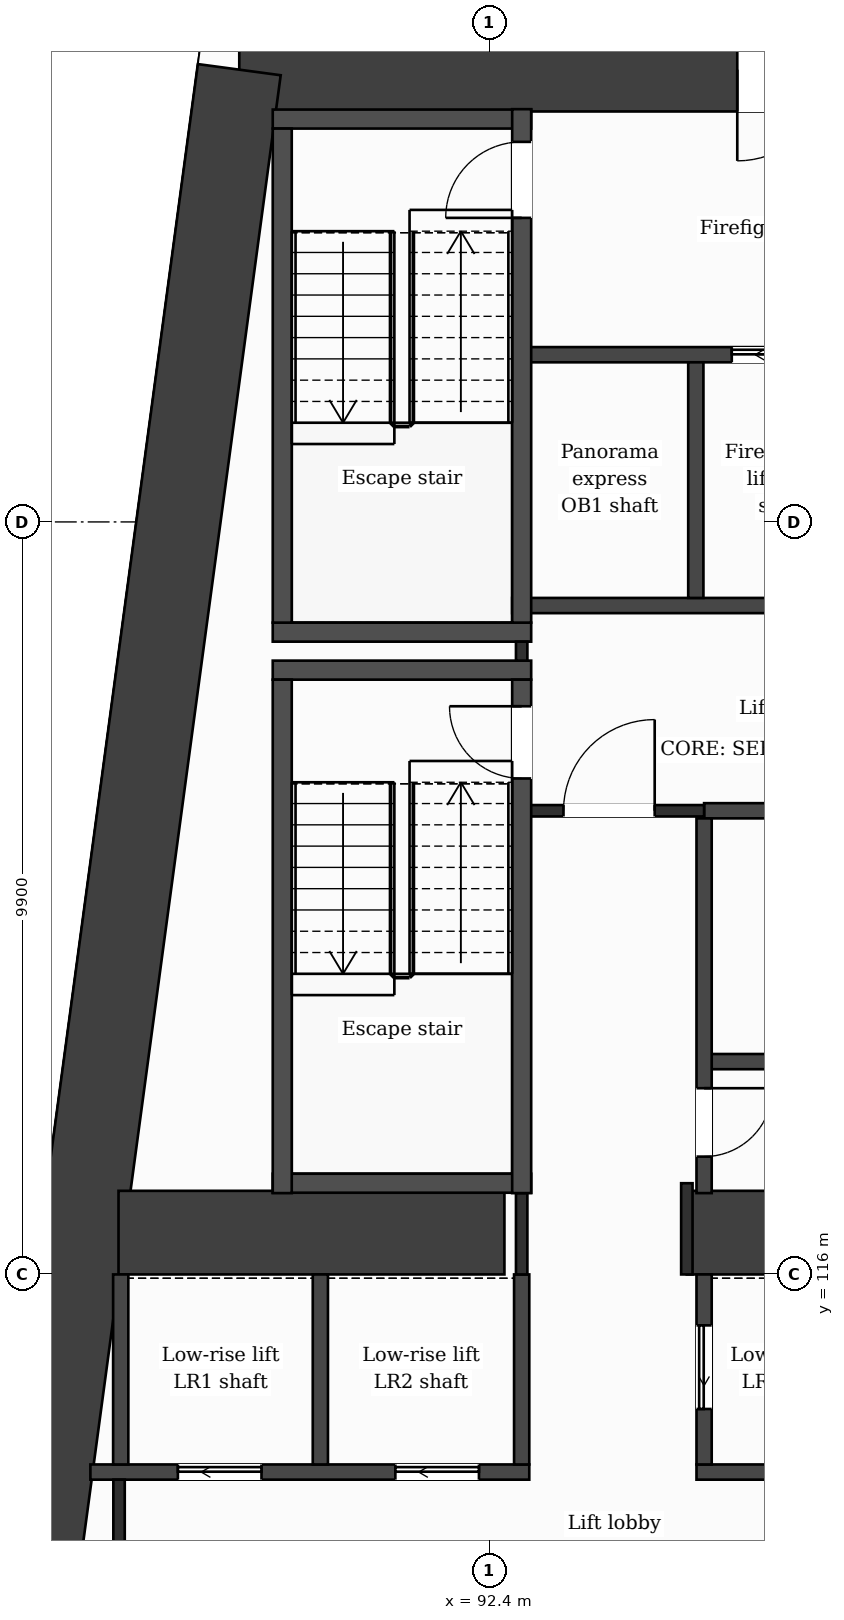
"""IFC4 building model, lengths in metres.
Left out: names, types, materials, properties, quantities, classifications, styles, units other than length and angle.
Written with IfcOpenShell. Run it as: python <this file> out.ifc"""

import sys

from ifc_helpers import new_model, si_unit, direction, frame, frame_2d, origin, place, context, subcontext, project, spatial, rectangle, extrude, element, fill, save


model = new_model("IFC4")
c1 = context("Model", 3, precision=1e-05, world=origin(), true_north=direction((0.0, 1.0)))
c2 = subcontext(c1, "Body", "Model", "MODEL_VIEW")
j1 = project(units=[si_unit("LENGTHUNIT", "METRE"), si_unit("PLANEANGLEUNIT", "RADIAN")], contexts=[c1])
p1 = place(None, origin())
s1 = spatial("IfcSite", under=j1, at=p1, CompositionType="ELEMENT")
p2 = place(p1, origin())
s2 = spatial("IfcBuilding", under=s1, at=p2, CompositionType="ELEMENT")
p3 = place(p2, frame((0.0, 0.0, 42.5)))
s3 = spatial("IfcBuildingStorey", under=s2, at=p3, CompositionType="ELEMENT", Elevation=42.5)
p4 = place(p3, frame((89.112, 131.85, 0.0), z_axis=(0.0, 0.0, 1.0), x_axis=(1.0, 0.0, 0.0)))
e1 = element("IfcWall", 1, at=p4, inside=s3, PredefinedType="SHEAR", context=c2, shape_type="SweptSolid", body=[
    extrude(rectangle(XDim=11.138, YDim=1.1, at=frame_2d((5.569, 0.0))), origin(), (0.0, 0.0, 1.0), 3.5),
])
p5 = place(p4, frame((6.552, 0.0, 0.0)))
e2 = element("IfcOpeningElement", 2, at=p5, cuts=e1, PredefinedType="OPENING", context=c2, shape_type="SweptSolid", body=[
    extrude(rectangle(XDim=1.2, YDim=2.1, at=frame_2d((0.6, 1.05))), frame((0.0, 0.56, 0.0), z_axis=(0.0, -1.0, 0.0), x_axis=(1.0, 0.0, 0.0)), (0.0, 0.0, 1.0), 1.12),
])
p6 = place(p3, frame((86.298, 110.95, 0.0), z_axis=(0.0, 0.0, 1.0), x_axis=(0.133400422634, 0.99106222168, 0.0)))
e3 = element("IfcWall", 3, at=p6, inside=s3, PredefinedType="SHEAR", context=c2, shape_type="SweptSolid", body=[
    extrude(rectangle(XDim=21.089, YDim=1.1, at=frame_2d((10.544, 0.0))), origin(), (0.0, 0.0, 1.0), 3.5),
])
p7 = place(p3, frame((87.523, 116.55, 0.0), z_axis=(0.0, 0.0, 1.0), x_axis=(1.0, 0.0, 0.0)))
e4 = element("IfcWall", 4, at=p7, inside=s3, PredefinedType="SHEAR", context=c2, shape_type="SweptSolid", body=[
    extrude(rectangle(XDim=5.077, YDim=1.1, at=frame_2d((2.539, 0.0))), origin(), (0.0, 0.0, 1.0), 3.5),
])
p8 = place(p3, frame((95.0, 116.55, 0.0), z_axis=(0.0, 0.0, 1.0), x_axis=(1.0, 0.0, 0.0)))
e5 = element("IfcWall", 5, at=p8, inside=s3, PredefinedType="SHEAR", context=c2, shape_type="SweptSolid", body=[
    extrude(rectangle(XDim=4.7, YDim=1.1, at=frame_2d((2.35, 0.0))), origin(), (0.0, 0.0, 1.0), 3.5),
])
p9 = place(p3, frame((87.153, 113.4, 0.0), z_axis=(0.0, 0.0, 1.0), x_axis=(1.0, 0.0, 0.0)))
e6 = element("IfcWall", 6, at=p9, inside=s3, PredefinedType="PARTITIONING", context=c2, shape_type="SweptSolid", body=[
    extrude(rectangle(XDim=5.774, YDim=0.2, at=frame_2d((2.887, 0.0))), origin(), (0.0, 0.0, 1.0), 3.18),
])
p10 = place(p9, frame((1.151, 0.0, 0.0)))
e7 = element("IfcOpeningElement", 7, at=p10, cuts=e6, PredefinedType="OPENING", context=c2, shape_type="SweptSolid", body=[
    extrude(rectangle(XDim=1.1, YDim=2.1, at=frame_2d((0.55, 1.05))), frame((0.0, 0.11, 0.0), z_axis=(0.0, -1.0, 0.0), x_axis=(1.0, 0.0, 0.0)), (0.0, 0.0, 1.0), 0.22),
])
p11 = place(p9, frame((4.012, 0.0, 0.0)))
e8 = element("IfcOpeningElement", 8, at=p11, cuts=e6, PredefinedType="OPENING", context=c2, shape_type="SweptSolid", body=[
    extrude(rectangle(XDim=1.1, YDim=2.1, at=frame_2d((0.55, 1.05))), frame((0.0, 0.11, 0.0), z_axis=(0.0, -1.0, 0.0), x_axis=(1.0, 0.0, 0.0)), (0.0, 0.0, 1.0), 0.22),
])
p12 = place(p3, frame((95.127, 113.4, 0.0), z_axis=(0.0, 0.0, 1.0), x_axis=(1.0, 0.0, 0.0)))
e9 = element("IfcWall", 9, at=p12, inside=s3, PredefinedType="PARTITIONING", context=c2, shape_type="SweptSolid", body=[
    extrude(rectangle(XDim=4.573, YDim=0.2, at=frame_2d((2.287, 0.0))), origin(), (0.0, 0.0, 1.0), 3.18),
])
p13 = place(p12, frame((3.068, 0.0, 0.0)))
e10 = element("IfcOpeningElement", 10, at=p13, cuts=e9, PredefinedType="OPENING", context=c2, shape_type="SweptSolid", body=[
    extrude(rectangle(XDim=0.9, YDim=2.1, at=frame_2d((0.45, 1.05))), frame((0.0, 0.11, 0.0), z_axis=(0.0, -1.0, 0.0), x_axis=(1.0, 0.0, 0.0)), (0.0, 0.0, 1.0), 0.22),
])
p14 = place(p3, frame((89.552, 117.2, 0.0), z_axis=(0.0, 0.0, 1.0), x_axis=(1.0, 0.0, 0.0)))
e11 = element("IfcWall", 11, at=p14, inside=s3, PredefinedType="PARTITIONING", context=c2, shape_type="SweptSolid", body=[
    extrude(rectangle(XDim=3.4, YDim=0.25, at=frame_2d((1.7, 0.0))), origin(), (0.0, 0.0, 1.0), 3.18),
])
p15 = place(p3, frame((95.227, 118.8, 0.0), z_axis=(0.0, 0.0, 1.0), x_axis=(1.0, 0.0, 0.0)))
e12 = element("IfcWall", 12, at=p15, inside=s3, PredefinedType="PARTITIONING", context=c2, shape_type="SweptSolid", body=[
    extrude(rectangle(XDim=4.473, YDim=0.2, at=frame_2d((2.236, 0.0))), origin(), (0.0, 0.0, 1.0), 3.18),
])
p16 = place(p3, frame((95.227, 122.1, 0.0), z_axis=(0.0, 0.0, 1.0), x_axis=(1.0, 0.0, 0.0)))
e13 = element("IfcWall", 13, at=p16, inside=s3, PredefinedType="PARTITIONING", context=c2, shape_type="SweptSolid", body=[
    extrude(rectangle(XDim=4.473, YDim=0.2, at=frame_2d((2.236, 0.0))), origin(), (0.0, 0.0, 1.0), 3.18),
])
p17 = place(p16, frame((1.786, 0.0, 0.0)))
e14 = element("IfcOpeningElement", 14, at=p17, cuts=e13, PredefinedType="OPENING", context=c2, shape_type="SweptSolid", body=[
    extrude(rectangle(XDim=0.9, YDim=2.1, at=frame_2d((0.45, 1.05))), frame((0.0, 0.11, 0.0), z_axis=(0.0, -1.0, 0.0), x_axis=(1.0, 0.0, 0.0)), (0.0, 0.0, 1.0), 0.22),
])
p18 = place(p3, frame((92.827, 122.1, 0.0), z_axis=(0.0, 0.0, 1.0), x_axis=(1.0, 0.0, 0.0)))
e15 = element("IfcWall", 15, at=p18, inside=s3, PredefinedType="PARTITIONING", context=c2, shape_type="SweptSolid", body=[
    extrude(rectangle(XDim=2.4, YDim=0.15, at=frame_2d((1.2, 0.0))), origin(), (0.0, 0.0, 1.0), 3.18),
])
p19 = place(p18, frame((0.55, 0.0, 0.0)))
e16 = element("IfcOpeningElement", 16, at=p19, cuts=e15, PredefinedType="OPENING", context=c2, shape_type="SweptSolid", body=[
    extrude(rectangle(XDim=1.2, YDim=2.1, at=frame_2d((0.6, 1.05))), frame((0.0, 0.085, 0.0), z_axis=(0.0, -1.0, 0.0), x_axis=(1.0, 0.0, 0.0)), (0.0, 0.0, 1.0), 0.17),
])
for number, where, z_axis, x_axis in (
    (17, (89.552, 123.95, 0.0), (0.0, 0.0, 1.0), (1.0, 0.0, 0.0)),
    (18, (89.552, 124.45, 0.0), (0.0, 0.0, 1.0), (1.0, 0.0, 0.0)),
):
    element("IfcWall", number, at=place(p3, frame(where, z_axis=z_axis, x_axis=x_axis)), inside=s3, PredefinedType="PARTITIONING", context=c2, shape_type="SweptSolid", body=[
        extrude(rectangle(XDim=3.4, YDim=0.25, at=frame_2d((1.7, 0.0))), origin(), (0.0, 0.0, 1.0), 3.18),
    ])
p20 = place(p3, frame((92.702, 124.8, 0.0), z_axis=(0.0, 0.0, 1.0), x_axis=(1.0, 0.0, 0.0)))
e19 = element("IfcWall", 19, at=p20, inside=s3, PredefinedType="PARTITIONING", context=c2, shape_type="SweptSolid", body=[
    extrude(rectangle(XDim=6.998, YDim=0.2, at=frame_2d((3.499, 0.0))), origin(), (0.0, 0.0, 1.0), 3.18),
])
p21 = place(p20, frame((5.253, 0.0, 0.0)))
e20 = element("IfcOpeningElement", 20, at=p21, cuts=e19, PredefinedType="OPENING", context=c2, shape_type="SweptSolid", body=[
    extrude(rectangle(XDim=1.1, YDim=2.1, at=frame_2d((0.55, 1.05))), frame((0.0, 0.11, 0.0), z_axis=(0.0, -1.0, 0.0), x_axis=(1.0, 0.0, 0.0)), (0.0, 0.0, 1.0), 0.22),
])
p22 = place(p3, frame((92.827, 128.1, 0.0), z_axis=(0.0, 0.0, 1.0), x_axis=(1.0, 0.0, 0.0)))
e21 = element("IfcWall", 21, at=p22, inside=s3, PredefinedType="PARTITIONING", context=c2, shape_type="SweptSolid", body=[
    extrude(rectangle(XDim=6.873, YDim=0.2, at=frame_2d((3.437, 0.0))), origin(), (0.0, 0.0, 1.0), 3.18),
])
p23 = place(p22, frame((2.764, 0.0, 0.0)))
e22 = element("IfcOpeningElement", 22, at=p23, cuts=e21, PredefinedType="OPENING", context=c2, shape_type="SweptSolid", body=[
    extrude(rectangle(XDim=1.1, YDim=2.1, at=frame_2d((0.55, 1.05))), frame((0.0, 0.11, 0.0), z_axis=(0.0, -1.0, 0.0), x_axis=(1.0, 0.0, 0.0)), (0.0, 0.0, 1.0), 0.22),
])
p24 = place(p3, frame((89.552, 131.2, 0.0), z_axis=(0.0, 0.0, 1.0), x_axis=(1.0, 0.0, 0.0)))
e23 = element("IfcWall", 23, at=p24, inside=s3, PredefinedType="PARTITIONING", context=c2, shape_type="SweptSolid", body=[
    extrude(rectangle(XDim=3.4, YDim=0.25, at=frame_2d((1.7, 0.0))), origin(), (0.0, 0.0, 1.0), 3.18),
])
p25 = place(p3, frame((87.552, 113.5, 0.0), z_axis=(0.0, 0.0, 1.0), x_axis=(0.0, 1.0, 0.0)))
e24 = element("IfcWall", 24, at=p25, inside=s3, PredefinedType="PARTITIONING", context=c2, shape_type="SweptSolid", body=[
    extrude(rectangle(XDim=2.5, YDim=0.2, at=frame_2d((1.25, 0.0))), origin(), (0.0, 0.0, 1.0), 3.18),
])
p26 = place(p3, frame((87.53, 111.5, 0.0), z_axis=(0.0, 0.0, 1.0), x_axis=(0.0, 1.0, 0.0)))
e25 = element("IfcWall", 25, at=p26, inside=s3, PredefinedType="PARTITIONING", context=c2, shape_type="SweptSolid", body=[
    extrude(rectangle(XDim=1.8, YDim=0.15, at=frame_2d((0.9, 0.0))), origin(), (0.0, 0.0, 1.0), 3.18),
])
p27 = place(p3, frame((89.677, 117.07, 0.0), z_axis=(0.0, 0.0, 1.0), x_axis=(0.0, 1.0, 0.0)))
e26 = element("IfcWall", 26, at=p27, inside=s3, PredefinedType="PARTITIONING", context=c2, shape_type="SweptSolid", body=[
    extrude(rectangle(XDim=6.755, YDim=0.25, at=frame_2d((3.377, 0.0))), origin(), (0.0, 0.0, 1.0), 3.18),
])
p28 = place(p3, frame((89.677, 124.575, 0.0), z_axis=(0.0, 0.0, 1.0), x_axis=(0.0, 1.0, 0.0)))
e27 = element("IfcWall", 27, at=p28, inside=s3, PredefinedType="PARTITIONING", context=c2, shape_type="SweptSolid", body=[
    extrude(rectangle(XDim=6.5, YDim=0.25, at=frame_2d((3.25, 0.0))), origin(), (0.0, 0.0, 1.0), 3.18),
])
for number, where, z_axis, x_axis in (
    (28, (90.178, 113.5, 0.0), (0.0, 0.0, 1.0), (0.0, 1.0, 0.0)),
    (29, (92.827, 113.5, 0.0), (0.0, 0.0, 1.0), (0.0, 1.0, 0.0)),
):
    element("IfcWall", number, at=place(p3, frame(where, z_axis=z_axis, x_axis=x_axis)), inside=s3, PredefinedType="PARTITIONING", context=c2, shape_type="SweptSolid", body=[
        extrude(rectangle(XDim=2.5, YDim=0.2, at=frame_2d((1.25, 0.0))), origin(), (0.0, 0.0, 1.0), 3.18),
    ])
p29 = place(p3, frame((92.827, 116.0, 0.0), z_axis=(0.0, 0.0, 1.0), x_axis=(0.0, 1.0, 0.0)))
e30 = element("IfcWall", 30, at=p29, inside=s3, PredefinedType="PARTITIONING", context=c2, shape_type="SweptSolid", body=[
    extrude(rectangle(XDim=1.07, YDim=0.15, at=frame_2d((0.535, 0.0))), origin(), (0.0, 0.0, 1.0), 3.18),
])
p30 = place(p3, frame((92.827, 124.075, 0.0), z_axis=(0.0, 0.0, 1.0), x_axis=(0.0, 1.0, 0.0)))
e31 = element("IfcWall", 31, at=p30, inside=s3, PredefinedType="PARTITIONING", context=c2, shape_type="SweptSolid", body=[
    extrude(rectangle(XDim=0.25, YDim=0.15, at=frame_2d((0.125, 0.0))), origin(), (0.0, 0.0, 1.0), 3.18),
])
p31 = place(p3, frame((92.827, 117.07, 0.0), z_axis=(0.0, 0.0, 1.0), x_axis=(0.0, 1.0, 0.0)))
e32 = element("IfcWall", 32, at=p31, inside=s3, PredefinedType="PARTITIONING", context=c2, shape_type="SweptSolid", body=[
    extrude(rectangle(XDim=6.755, YDim=0.25, at=frame_2d((3.377, 0.0))), origin(), (0.0, 0.0, 1.0), 3.18),
])
p32 = place(p31, frame((5.455, 0.0, 0.0)))
e33 = element("IfcOpeningElement", 33, at=p32, cuts=e32, PredefinedType="OPENING", context=c2, shape_type="SweptSolid", body=[
    extrude(rectangle(XDim=0.95, YDim=2.1, at=frame_2d((0.475, 1.05))), frame((0.0, 0.135, 0.0), z_axis=(0.0, -1.0, 0.0), x_axis=(1.0, 0.0, 0.0)), (0.0, 0.0, 1.0), 0.27),
])
p33 = place(p3, frame((92.827, 124.575, 0.0), z_axis=(0.0, 0.0, 1.0), x_axis=(0.0, 1.0, 0.0)))
e34 = element("IfcWall", 34, at=p33, inside=s3, PredefinedType="PARTITIONING", context=c2, shape_type="SweptSolid", body=[
    extrude(rectangle(XDim=6.755, YDim=0.25, at=frame_2d((3.377, 0.0))), origin(), (0.0, 0.0, 1.0), 3.18),
])
p34 = place(p33, frame((5.325, 0.0, 0.0)))
e35 = element("IfcOpeningElement", 35, at=p34, cuts=e34, PredefinedType="OPENING", context=c2, shape_type="SweptSolid", body=[
    extrude(rectangle(XDim=1.0, YDim=2.1, at=frame_2d((0.5, 1.05))), frame((0.0, 0.135, 0.0), z_axis=(0.0, -1.0, 0.0), x_axis=(1.0, 0.0, 0.0)), (0.0, 0.0, 1.0), 0.27),
])
p35 = place(p3, frame((95.0, 116.0, 0.0), z_axis=(0.0, 0.0, 1.0), x_axis=(0.0, 1.0, 0.0)))
e36 = element("IfcWall", 36, at=p35, inside=s3, PredefinedType="PARTITIONING", context=c2, shape_type="SweptSolid", body=[
    extrude(rectangle(XDim=1.2, YDim=0.15, at=frame_2d((0.6, 0.0))), origin(), (0.0, 0.0, 1.0), 3.18),
])
p36 = place(p3, frame((95.118, 124.9, 0.0), z_axis=(0.0, 0.0, 1.0), x_axis=(0.0, 1.0, 0.0)))
e37 = element("IfcWall", 37, at=p36, inside=s3, PredefinedType="PARTITIONING", context=c2, shape_type="SweptSolid", body=[
    extrude(rectangle(XDim=3.1, YDim=0.2, at=frame_2d((1.55, 0.0))), origin(), (0.0, 0.0, 1.0), 3.18),
])
p37 = place(p3, frame((95.227, 113.5, 0.0), z_axis=(0.0, 0.0, 1.0), x_axis=(0.0, 1.0, 0.0)))
e38 = element("IfcWall", 38, at=p37, inside=s3, PredefinedType="PARTITIONING", context=c2, shape_type="SweptSolid", body=[
    extrude(rectangle(XDim=2.5, YDim=0.2, at=frame_2d((1.25, 0.0))), origin(), (0.0, 0.0, 1.0), 3.18),
])
p38 = place(p37, frame((0.73, 0.0, 0.0)))
e39 = element("IfcOpeningElement", 39, at=p38, cuts=e38, PredefinedType="OPENING", context=c2, shape_type="SweptSolid", body=[
    extrude(rectangle(XDim=1.1, YDim=2.1, at=frame_2d((0.55, 1.05))), frame((0.0, 0.11, 0.0), z_axis=(0.0, -1.0, 0.0), x_axis=(1.0, 0.0, 0.0)), (0.0, 0.0, 1.0), 0.22),
])
p39 = place(p3, frame((95.227, 117.07, 0.0), z_axis=(0.0, 0.0, 1.0), x_axis=(0.0, 1.0, 0.0)))
e40 = element("IfcWall", 40, at=p39, inside=s3, PredefinedType="PARTITIONING", context=c2, shape_type="SweptSolid", body=[
    extrude(rectangle(XDim=4.93, YDim=0.2, at=frame_2d((2.465, 0.0))), origin(), (0.0, 0.0, 1.0), 3.18),
])
p40 = place(p39, frame((0.48, 0.0, 0.0)))
e41 = element("IfcOpeningElement", 41, at=p40, cuts=e40, PredefinedType="OPENING", context=c2, shape_type="SweptSolid", body=[
    extrude(rectangle(XDim=0.9, YDim=2.1, at=frame_2d((0.45, 1.05))), frame((0.0, 0.11, 0.0), z_axis=(0.0, -1.0, 0.0), x_axis=(1.0, 0.0, 0.0)), (0.0, 0.0, 1.0), 0.22),
])
p41 = place(p19, origin())
e42 = element("IfcDoor", 42, at=p41, inside=s3, OperationType="SINGLE_SWING_RIGHT", PredefinedType="DOOR", context=c2, shape_type="SweptSolid", body=[
    extrude(rectangle(XDim=1.2, YDim=2.1, at=frame_2d((0.6, 1.05))), frame((0.0, 0.025, 0.0), z_axis=(0.0, -1.0, 0.0), x_axis=(1.0, 0.0, 0.0)), (0.0, 0.0, 1.0), 0.05),
])
fill(e16, e42)
p42 = place(p23, origin())
e43 = element("IfcDoor", 43, at=p42, inside=s3, OperationType="SLIDING_TO_LEFT", PredefinedType="DOOR", context=c2, shape_type="SweptSolid", body=[
    extrude(rectangle(XDim=1.1, YDim=2.1, at=frame_2d((0.55, 1.05))), frame((0.0, 0.025, 0.0), z_axis=(0.0, -1.0, 0.0), x_axis=(1.0, 0.0, 0.0)), (0.0, 0.0, 1.0), 0.05),
])
fill(e22, e43)
p43 = place(p32, origin())
e44 = element("IfcDoor", 44, at=p43, inside=s3, OperationType="SINGLE_SWING_RIGHT", PredefinedType="DOOR", context=c2, shape_type="SweptSolid", body=[
    extrude(rectangle(XDim=0.95, YDim=2.1, at=frame_2d((0.475, 1.05))), frame((0.0, 0.025, 0.0), z_axis=(0.0, -1.0, 0.0), x_axis=(1.0, 0.0, 0.0)), (0.0, 0.0, 1.0), 0.05),
])
fill(e33, e44)
p44 = place(p34, origin())
e45 = element("IfcDoor", 45, at=p44, inside=s3, OperationType="SINGLE_SWING_LEFT", PredefinedType="DOOR", context=c2, shape_type="SweptSolid", body=[
    extrude(rectangle(XDim=1.0, YDim=2.1, at=frame_2d((0.5, 1.05))), frame((0.0, 0.025, 0.0), z_axis=(0.0, -1.0, 0.0), x_axis=(1.0, 0.0, 0.0)), (0.0, 0.0, 1.0), 0.05),
])
fill(e35, e45)
p45 = place(p40, origin())
e46 = element("IfcDoor", 46, at=p45, inside=s3, OperationType="SINGLE_SWING_RIGHT", PredefinedType="DOOR", context=c2, shape_type="SweptSolid", body=[
    extrude(rectangle(XDim=0.9, YDim=2.1, at=frame_2d((0.45, 1.05))), frame((0.0, 0.025, 0.0), z_axis=(0.0, -1.0, 0.0), x_axis=(1.0, 0.0, 0.0)), (0.0, 0.0, 1.0), 0.05),
])
fill(e41, e46)
p46 = place(p10, origin())
e47 = element("IfcDoor", 47, at=p46, inside=s3, OperationType="SLIDING_TO_LEFT", PredefinedType="DOOR", context=c2, shape_type="SweptSolid", body=[
    extrude(rectangle(XDim=1.1, YDim=2.1, at=frame_2d((0.55, 1.05))), frame((0.0, 0.025, 0.0), z_axis=(0.0, -1.0, 0.0), x_axis=(1.0, 0.0, 0.0)), (0.0, 0.0, 1.0), 0.05),
])
fill(e7, e47)
p47 = place(p11, origin())
e48 = element("IfcDoor", 48, at=p47, inside=s3, OperationType="SLIDING_TO_LEFT", PredefinedType="DOOR", context=c2, shape_type="SweptSolid", body=[
    extrude(rectangle(XDim=1.1, YDim=2.1, at=frame_2d((0.55, 1.05))), frame((0.0, 0.025, 0.0), z_axis=(0.0, -1.0, 0.0), x_axis=(1.0, 0.0, 0.0)), (0.0, 0.0, 1.0), 0.05),
])
fill(e8, e48)
p48 = place(p38, origin())
e49 = element("IfcDoor", 49, at=p48, inside=s3, OperationType="SLIDING_TO_LEFT", PredefinedType="DOOR", context=c2, shape_type="SweptSolid", body=[
    extrude(rectangle(XDim=1.1, YDim=2.1, at=frame_2d((0.55, 1.05))), frame((0.0, 0.025, 0.0), z_axis=(0.0, -1.0, 0.0), x_axis=(1.0, 0.0, 0.0)), (0.0, 0.0, 1.0), 0.05),
])
fill(e39, e49)
p49 = place(p5, origin())
e50 = element("IfcDoor", 50, at=p49, inside=s3, OperationType="SINGLE_SWING_LEFT", PredefinedType="DOOR", context=c2, shape_type="SweptSolid", body=[
    extrude(rectangle(XDim=1.2, YDim=2.1, at=frame_2d((0.6, 1.05))), frame((0.0, 0.025, 0.0), z_axis=(0.0, -1.0, 0.0), x_axis=(1.0, 0.0, 0.0)), (0.0, 0.0, 1.0), 0.05),
])
fill(e2, e50)
save(model, sys.argv[1])
